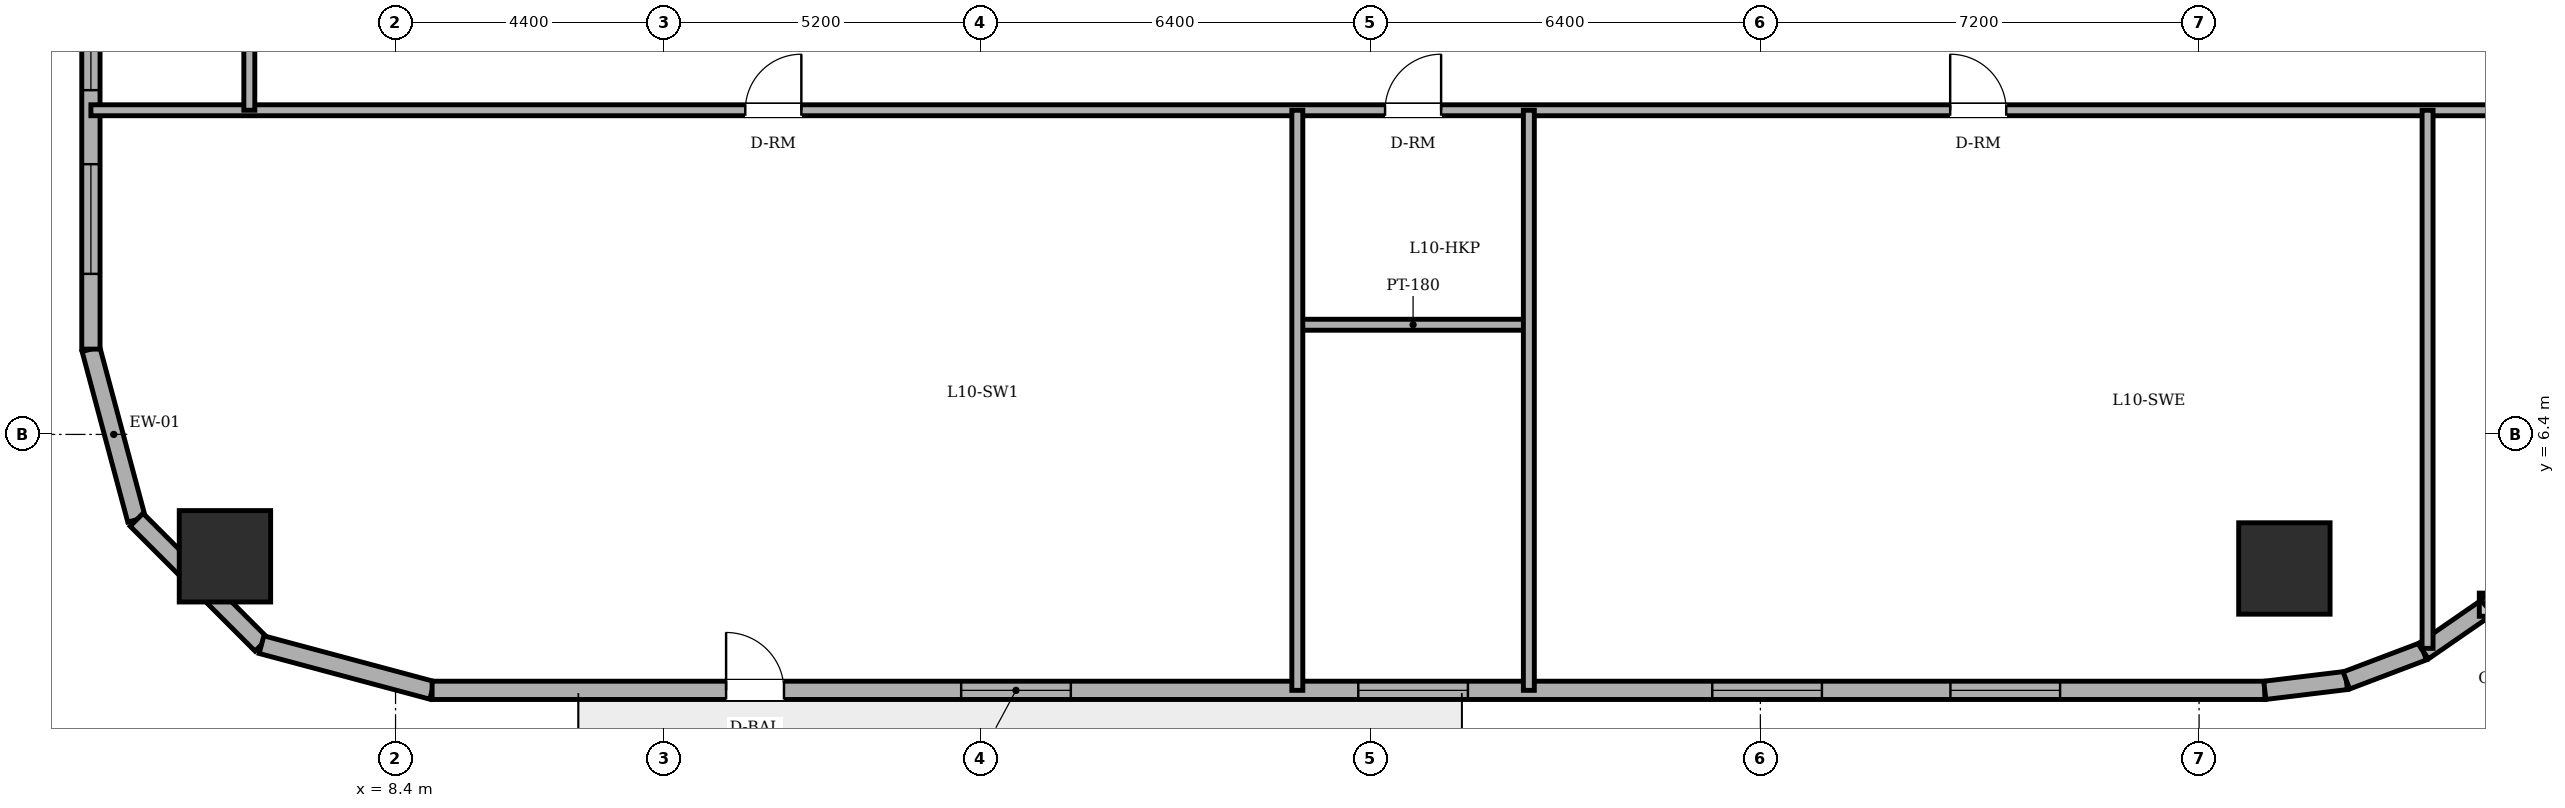
"""IFC4 building model, lengths in metres.
Left out: names, types, materials, properties, quantities, classifications, styles, units other than length and angle.
Written with IfcOpenShell. Run it as: python <this file> out.ifc"""

import sys

from ifc_helpers import new_model, si_unit, direction, frame, frame_2d, origin, origin_2d, place, context, subcontext, project, spatial, rectangle, circle, extrude, element, fill, save


model = new_model("IFC4")
c1 = context("Model", 3, precision=1e-05, world=origin(), true_north=direction((0.0, 1.0)))
c2 = subcontext(c1, "Body", "Model", "MODEL_VIEW")
j1 = project(units=[si_unit("LENGTHUNIT", "METRE"), si_unit("PLANEANGLEUNIT", "RADIAN")], contexts=[c1])
p1 = place(None, origin())
s1 = spatial("IfcSite", under=j1, at=p1, CompositionType="ELEMENT")
p2 = place(p1, origin())
s2 = spatial("IfcBuilding", under=s1, at=p2, CompositionType="ELEMENT")
p3 = place(p2, frame((0.0, 0.0, 39.6)))
s3 = spatial("IfcBuildingStorey", under=s2, at=p3, CompositionType="ELEMENT", Elevation=39.6)
for number, where, z_axis, x_axis in (
    (1, (5.6, 4.4, 0.0), (0.0, 0.0, 1.0), (1.0, 0.0, 0.0)),
    (2, (39.4, 4.2, 0.0), (0.0, 0.0, 1.0), (1.0, 0.0, 0.0)),
):
    element("IfcColumn", number, at=place(p3, frame(where, z_axis=z_axis, x_axis=x_axis)), inside=s3, PredefinedType="COLUMN", context=c2, shape_type="SweptSolid", body=[
        extrude(circle(Radius=0.75, at=origin_2d()), origin(), (0.0, 0.0, 1.0), 3.6),
    ])
p4 = place(p3, frame((3.4, 7.8, 0.0), z_axis=(0.0, 0.0, 1.0), x_axis=(0.258731875344, -0.96594917914, 0.0)))
e3 = element("IfcWall", 3, at=p4, inside=s3, PredefinedType="SOLIDWALL", context=c2, shape_type="SweptSolid", body=[
    extrude(rectangle(XDim=2.899, YDim=0.3, at=frame_2d((1.449, 0.0))), origin(), (0.0, 0.0, 1.0), 3.4),
])
p5 = place(p3, frame((4.15, 5.0, 0.0), z_axis=(0.0, 0.0, 1.0), x_axis=(0.707106781187, -0.707106781187, 0.0)))
e4 = element("IfcWall", 4, at=p5, inside=s3, PredefinedType="SOLIDWALL", context=c2, shape_type="SweptSolid", body=[
    extrude(rectangle(XDim=2.899, YDim=0.3, at=frame_2d((1.45, 0.0))), origin(), (0.0, 0.0, 1.0), 3.4),
])
p6 = place(p3, frame((6.2, 2.95, 0.0), z_axis=(0.0, 0.0, 1.0), x_axis=(0.96594917914, -0.258731875344, 0.0)))
e5 = element("IfcWall", 5, at=p6, inside=s3, PredefinedType="SOLIDWALL", context=c2, shape_type="SweptSolid", body=[
    extrude(rectangle(XDim=2.899, YDim=0.3, at=frame_2d((1.449, 0.0))), origin(), (0.0, 0.0, 1.0), 3.4),
])
p7 = place(p3, frame((9.0, 2.2, 0.0), z_axis=(0.0, 0.0, 1.0), x_axis=(1.0, 0.0, 0.0)))
e6 = element("IfcWall", 6, at=p7, inside=s3, PredefinedType="SOLIDWALL", context=c2, shape_type="SweptSolid", body=[
    extrude(rectangle(XDim=30.079, YDim=0.3, at=frame_2d((15.04, 0.0))), origin(), (0.0, 0.0, 1.0), 3.4),
])
p8 = place(p7, frame((4.825, 0.0, 0.0)))
e7 = element("IfcOpeningElement", 7, at=p8, cuts=e6, PredefinedType="OPENING", context=c2, shape_type="SweptSolid", body=[
    extrude(rectangle(XDim=0.95, YDim=2.2, at=frame_2d((0.475, 1.1))), frame((0.0, 0.16, 0.0), z_axis=(0.0, -1.0, 0.0), x_axis=(1.0, 0.0, 0.0)), (0.0, 0.0, 1.0), 0.32),
])
p9 = place(p7, frame((8.683, 0.0, 0.85)))
e8 = element("IfcOpeningElement", 8, at=p9, cuts=e6, PredefinedType="OPENING", context=c2, shape_type="SweptSolid", body=[
    extrude(rectangle(XDim=1.8, YDim=1.55, at=frame_2d((0.9, 0.775))), frame((0.0, 0.16, 0.0), z_axis=(0.0, -1.0, 0.0), x_axis=(1.0, 0.0, 0.0)), (0.0, 0.0, 1.0), 0.32),
])
p10 = place(p7, frame((15.2, 0.0, 0.85)))
e9 = element("IfcOpeningElement", 9, at=p10, cuts=e6, PredefinedType="OPENING", context=c2, shape_type="SweptSolid", body=[
    extrude(rectangle(XDim=1.8, YDim=1.55, at=frame_2d((0.9, 0.775))), frame((0.0, 0.16, 0.0), z_axis=(0.0, -1.0, 0.0), x_axis=(1.0, 0.0, 0.0)), (0.0, 0.0, 1.0), 0.32),
])
p11 = place(p7, frame((21.01, 0.0, 0.85)))
e10 = element("IfcOpeningElement", 10, at=p11, cuts=e6, PredefinedType="OPENING", context=c2, shape_type="SweptSolid", body=[
    extrude(rectangle(XDim=1.8, YDim=1.55, at=frame_2d((0.9, 0.775))), frame((0.0, 0.16, 0.0), z_axis=(0.0, -1.0, 0.0), x_axis=(1.0, 0.0, 0.0)), (0.0, 0.0, 1.0), 0.32),
])
p12 = place(p7, frame((24.919, 0.0, 0.85)))
e11 = element("IfcOpeningElement", 11, at=p12, cuts=e6, PredefinedType="OPENING", context=c2, shape_type="SweptSolid", body=[
    extrude(rectangle(XDim=1.8, YDim=1.55, at=frame_2d((0.9, 0.775))), frame((0.0, 0.16, 0.0), z_axis=(0.0, -1.0, 0.0), x_axis=(1.0, 0.0, 0.0)), (0.0, 0.0, 1.0), 0.32),
])
p13 = place(p3, frame((39.079, 2.2, 0.0), z_axis=(0.0, 0.0, 1.0), x_axis=(0.992739027259, 0.120288086515, 0.0)))
e12 = element("IfcWall", 12, at=p13, inside=s3, PredefinedType="SOLIDWALL", context=c2, shape_type="SweptSolid", body=[
    extrude(rectangle(XDim=1.348, YDim=0.3, at=frame_2d((0.674, 0.0))), origin(), (0.0, 0.0, 1.0), 3.4),
])
p14 = place(p3, frame((40.417, 2.362, 0.0), z_axis=(0.0, 0.0, 1.0), x_axis=(0.935156721165, 0.354234254216, 0.0)))
e13 = element("IfcWall", 13, at=p14, inside=s3, PredefinedType="SOLIDWALL", context=c2, shape_type="SweptSolid", body=[
    extrude(rectangle(XDim=1.349, YDim=0.3, at=frame_2d((0.675, 0.0))), origin(), (0.0, 0.0, 1.0), 3.4),
])
p15 = place(p3, frame((41.679, 2.84, 0.0), z_axis=(0.0, 0.0, 1.0), x_axis=(0.823116500192, 0.567872544777, 0.0)))
e14 = element("IfcWall", 14, at=p15, inside=s3, PredefinedType="SOLIDWALL", context=c2, shape_type="SweptSolid", body=[
    extrude(rectangle(XDim=1.349, YDim=0.3, at=frame_2d((0.674, 0.0))), origin(), (0.0, 0.0, 1.0), 3.4),
])
p16 = place(p3, frame((3.4, 40.2, 0.0), z_axis=(0.0, 0.0, 1.0), x_axis=(0.0, -1.0, 0.0)))
e15 = element("IfcWall", 15, at=p16, inside=s3, PredefinedType="SOLIDWALL", context=c2, shape_type="SweptSolid", body=[
    extrude(rectangle(XDim=32.4, YDim=0.3, at=frame_2d((16.2, 0.0))), origin(), (0.0, 0.0, 1.0), 3.4),
])
p17 = place(p16, frame((1.235, 0.0, 0.85)))
e16 = element("IfcOpeningElement", 16, at=p17, cuts=e15, PredefinedType="OPENING", context=c2, shape_type="SweptSolid", body=[
    extrude(rectangle(XDim=1.8, YDim=1.55, at=frame_2d((0.9, 0.775))), frame((0.0, 0.16, 0.0), z_axis=(0.0, -1.0, 0.0), x_axis=(1.0, 0.0, 0.0)), (0.0, 0.0, 1.0), 0.32),
])
p18 = place(p16, frame((4.25, 0.0, 0.85)))
e17 = element("IfcOpeningElement", 17, at=p18, cuts=e15, PredefinedType="OPENING", context=c2, shape_type="SweptSolid", body=[
    extrude(rectangle(XDim=1.8, YDim=1.55, at=frame_2d((0.9, 0.775))), frame((0.0, 0.16, 0.0), z_axis=(0.0, -1.0, 0.0), x_axis=(1.0, 0.0, 0.0)), (0.0, 0.0, 1.0), 0.32),
])
p19 = place(p16, frame((9.253, 0.0, 0.85)))
e18 = element("IfcOpeningElement", 18, at=p19, cuts=e15, PredefinedType="OPENING", context=c2, shape_type="SweptSolid", body=[
    extrude(rectangle(XDim=1.8, YDim=1.55, at=frame_2d((0.9, 0.775))), frame((0.0, 0.16, 0.0), z_axis=(0.0, -1.0, 0.0), x_axis=(1.0, 0.0, 0.0)), (0.0, 0.0, 1.0), 0.32),
])
p20 = place(p16, frame((13.027, 0.0, 0.85)))
e19 = element("IfcOpeningElement", 19, at=p20, cuts=e15, PredefinedType="OPENING", context=c2, shape_type="SweptSolid", body=[
    extrude(rectangle(XDim=1.8, YDim=1.55, at=frame_2d((0.9, 0.775))), frame((0.0, 0.16, 0.0), z_axis=(0.0, -1.0, 0.0), x_axis=(1.0, 0.0, 0.0)), (0.0, 0.0, 1.0), 0.32),
])
p21 = place(p16, frame((19.573, 0.0, 0.85)))
e20 = element("IfcOpeningElement", 20, at=p21, cuts=e15, PredefinedType="OPENING", context=c2, shape_type="SweptSolid", body=[
    extrude(rectangle(XDim=1.8, YDim=1.55, at=frame_2d((0.9, 0.775))), frame((0.0, 0.16, 0.0), z_axis=(0.0, -1.0, 0.0), x_axis=(1.0, 0.0, 0.0)), (0.0, 0.0, 1.0), 0.32),
])
p22 = place(p16, frame((22.347, 0.0, 0.85)))
e21 = element("IfcOpeningElement", 21, at=p22, cuts=e15, PredefinedType="OPENING", context=c2, shape_type="SweptSolid", body=[
    extrude(rectangle(XDim=1.8, YDim=1.55, at=frame_2d((0.9, 0.775))), frame((0.0, 0.16, 0.0), z_axis=(0.0, -1.0, 0.0), x_axis=(1.0, 0.0, 0.0)), (0.0, 0.0, 1.0), 0.32),
])
p23 = place(p16, frame((26.35, 0.0, 0.85)))
e22 = element("IfcOpeningElement", 22, at=p23, cuts=e15, PredefinedType="OPENING", context=c2, shape_type="SweptSolid", body=[
    extrude(rectangle(XDim=1.8, YDim=1.55, at=frame_2d((0.9, 0.775))), frame((0.0, 0.16, 0.0), z_axis=(0.0, -1.0, 0.0), x_axis=(1.0, 0.0, 0.0)), (0.0, 0.0, 1.0), 0.32),
])
p24 = place(p16, frame((29.365, 0.0, 0.85)))
e23 = element("IfcOpeningElement", 23, at=p24, cuts=e15, PredefinedType="OPENING", context=c2, shape_type="SweptSolid", body=[
    extrude(rectangle(XDim=1.8, YDim=1.55, at=frame_2d((0.9, 0.775))), frame((0.0, 0.16, 0.0), z_axis=(0.0, -1.0, 0.0), x_axis=(1.0, 0.0, 0.0)), (0.0, 0.0, 1.0), 0.32),
])
p25 = place(p3, frame((23.2, 8.2, 0.0), z_axis=(0.0, 0.0, 1.0), x_axis=(1.0, 0.0, 0.0)))
e24 = element("IfcWall", 24, at=p25, inside=s3, PredefinedType="PARTITIONING", context=c2, shape_type="SweptSolid", body=[
    extrude(rectangle(XDim=3.8, YDim=0.18, at=frame_2d((1.9, 0.0))), origin(), (0.0, 0.0, 1.0), 3.4),
])
p26 = place(p3, frame((3.4, 11.72, 0.0), z_axis=(0.0, 0.0, 1.0), x_axis=(1.0, 0.0, 0.0)))
e25 = element("IfcWall", 25, at=p26, inside=s3, PredefinedType="PARTITIONING", context=c2, shape_type="SweptSolid", body=[
    extrude(rectangle(XDim=47.689, YDim=0.18, at=frame_2d((23.845, 0.0))), origin(), (0.0, 0.0, 1.0), 3.4),
])
p27 = place(p26, frame((21.24, 0.0, 0.0)))
e26 = element("IfcOpeningElement", 26, at=p27, cuts=e25, PredefinedType="OPENING", context=c2, shape_type="SweptSolid", body=[
    extrude(rectangle(XDim=0.92, YDim=2.1, at=frame_2d((0.46, 1.05))), frame((0.0, 0.1, 0.0), z_axis=(0.0, -1.0, 0.0), x_axis=(1.0, 0.0, 0.0)), (0.0, 0.0, 1.0), 0.2),
])
p28 = place(p26, frame((40.39, 0.0, 0.0)))
e27 = element("IfcOpeningElement", 27, at=p28, cuts=e25, PredefinedType="OPENING", context=c2, shape_type="SweptSolid", body=[
    extrude(rectangle(XDim=0.92, YDim=2.1, at=frame_2d((0.46, 1.05))), frame((0.0, 0.1, 0.0), z_axis=(0.0, -1.0, 0.0), x_axis=(1.0, 0.0, 0.0)), (0.0, 0.0, 1.0), 0.2),
])
p29 = place(p26, frame((10.74, 0.0, 0.0)))
e28 = element("IfcOpeningElement", 28, at=p29, cuts=e25, PredefinedType="OPENING", context=c2, shape_type="SweptSolid", body=[
    extrude(rectangle(XDim=0.92, YDim=2.1, at=frame_2d((0.46, 1.05))), frame((0.0, 0.1, 0.0), z_axis=(0.0, -1.0, 0.0), x_axis=(1.0, 0.0, 0.0)), (0.0, 0.0, 1.0), 0.2),
])
p30 = place(p26, frame((30.515, 0.0, 0.0)))
e29 = element("IfcOpeningElement", 29, at=p30, cuts=e25, PredefinedType="OPENING", context=c2, shape_type="SweptSolid", body=[
    extrude(rectangle(XDim=0.92, YDim=2.1, at=frame_2d((0.46, 1.05))), frame((0.0, 0.1, 0.0), z_axis=(0.0, -1.0, 0.0), x_axis=(1.0, 0.0, 0.0)), (0.0, 0.0, 1.0), 0.2),
])
p31 = place(p3, frame((6.0, 11.72, 0.0), z_axis=(0.0, 0.0, 1.0), x_axis=(0.0, 1.0, 0.0)))
e30 = element("IfcWall", 30, at=p31, inside=s3, PredefinedType="PARTITIONING", context=c2, shape_type="SweptSolid", body=[
    extrude(rectangle(XDim=2.46, YDim=0.18, at=frame_2d((1.23, 0.0))), origin(), (0.0, 0.0, 1.0), 3.4),
])
for number, where, z_axis, x_axis in (
    (31, (23.2, 2.2, 0.0), (0.0, 0.0, 1.0), (0.0, 1.0, 0.0)),
    (32, (27.0, 2.2, 0.0), (0.0, 0.0, 1.0), (0.0, 1.0, 0.0)),
):
    element("IfcWall", number, at=place(p3, frame(where, z_axis=z_axis, x_axis=x_axis)), inside=s3, PredefinedType="PARTITIONING", context=c2, shape_type="SweptSolid", body=[
        extrude(rectangle(XDim=9.52, YDim=0.18, at=frame_2d((4.76, 0.0))), origin(), (0.0, 0.0, 1.0), 3.4),
    ])
p32 = place(p3, frame((41.75, 2.889, 0.0), z_axis=(0.0, 0.0, 1.0), x_axis=(0.0, 1.0, 0.0)))
e33 = element("IfcWall", 33, at=p32, inside=s3, PredefinedType="PARTITIONING", context=c2, shape_type="SweptSolid", body=[
    extrude(rectangle(XDim=8.831, YDim=0.18, at=frame_2d((4.416, 0.0))), origin(), (0.0, 0.0, 1.0), 2.782),
])
p33 = place(p8, origin())
e34 = element("IfcDoor", 34, at=p33, inside=s3, OperationType="SINGLE_SWING_LEFT", PredefinedType="DOOR", context=c2, shape_type="SweptSolid", body=[
    extrude(rectangle(XDim=0.95, YDim=2.2, at=frame_2d((0.475, 1.1))), frame((0.0, 0.025, 0.0), z_axis=(0.0, -1.0, 0.0), x_axis=(1.0, 0.0, 0.0)), (0.0, 0.0, 1.0), 0.05),
])
fill(e7, e34)
p34 = place(p9, origin())
e35 = element("IfcWindow", 35, at=p34, inside=s3, PartitioningType="DOUBLE_PANEL_VERTICAL", PredefinedType="WINDOW", context=c2, shape_type="SweptSolid", body=[
    extrude(rectangle(XDim=1.8, YDim=1.55, at=frame_2d((0.9, 0.775))), frame((0.0, 0.03, 0.0), z_axis=(0.0, -1.0, 0.0), x_axis=(1.0, 0.0, 0.0)), (0.0, 0.0, 1.0), 0.06),
])
fill(e8, e35)
p35 = place(p10, origin())
e36 = element("IfcWindow", 36, at=p35, inside=s3, PartitioningType="DOUBLE_PANEL_VERTICAL", PredefinedType="WINDOW", context=c2, shape_type="SweptSolid", body=[
    extrude(rectangle(XDim=1.8, YDim=1.55, at=frame_2d((0.9, 0.775))), frame((0.0, 0.03, 0.0), z_axis=(0.0, -1.0, 0.0), x_axis=(1.0, 0.0, 0.0)), (0.0, 0.0, 1.0), 0.06),
])
fill(e9, e36)
p36 = place(p11, origin())
e37 = element("IfcWindow", 37, at=p36, inside=s3, PartitioningType="DOUBLE_PANEL_VERTICAL", PredefinedType="WINDOW", context=c2, shape_type="SweptSolid", body=[
    extrude(rectangle(XDim=1.8, YDim=1.55, at=frame_2d((0.9, 0.775))), frame((0.0, 0.03, 0.0), z_axis=(0.0, -1.0, 0.0), x_axis=(1.0, 0.0, 0.0)), (0.0, 0.0, 1.0), 0.06),
])
fill(e10, e37)
p37 = place(p12, origin())
e38 = element("IfcWindow", 38, at=p37, inside=s3, PartitioningType="DOUBLE_PANEL_VERTICAL", PredefinedType="WINDOW", context=c2, shape_type="SweptSolid", body=[
    extrude(rectangle(XDim=1.8, YDim=1.55, at=frame_2d((0.9, 0.775))), frame((0.0, 0.03, 0.0), z_axis=(0.0, -1.0, 0.0), x_axis=(1.0, 0.0, 0.0)), (0.0, 0.0, 1.0), 0.06),
])
fill(e11, e38)
p38 = place(p23, origin())
e39 = element("IfcWindow", 39, at=p38, inside=s3, PartitioningType="DOUBLE_PANEL_VERTICAL", PredefinedType="WINDOW", context=c2, shape_type="SweptSolid", body=[
    extrude(rectangle(XDim=1.8, YDim=1.55, at=frame_2d((0.9, 0.775))), frame((0.0, 0.03, 0.0), z_axis=(0.0, -1.0, 0.0), x_axis=(1.0, 0.0, 0.0)), (0.0, 0.0, 1.0), 0.06),
])
fill(e22, e39)
p39 = place(p24, origin())
e40 = element("IfcWindow", 40, at=p39, inside=s3, PartitioningType="DOUBLE_PANEL_VERTICAL", PredefinedType="WINDOW", context=c2, shape_type="SweptSolid", body=[
    extrude(rectangle(XDim=1.8, YDim=1.55, at=frame_2d((0.9, 0.775))), frame((0.0, 0.03, 0.0), z_axis=(0.0, -1.0, 0.0), x_axis=(1.0, 0.0, 0.0)), (0.0, 0.0, 1.0), 0.06),
])
fill(e23, e40)
p40 = place(p27, origin())
e41 = element("IfcDoor", 41, at=p40, inside=s3, OperationType="SINGLE_SWING_RIGHT", PredefinedType="DOOR", context=c2, shape_type="SweptSolid", body=[
    extrude(rectangle(XDim=0.92, YDim=2.1, at=frame_2d((0.46, 1.05))), frame((0.0, 0.025, 0.0), z_axis=(0.0, -1.0, 0.0), x_axis=(1.0, 0.0, 0.0)), (0.0, 0.0, 1.0), 0.05),
])
fill(e26, e41)
p41 = place(p29, origin())
e42 = element("IfcDoor", 42, at=p41, inside=s3, OperationType="SINGLE_SWING_RIGHT", PredefinedType="DOOR", context=c2, shape_type="SweptSolid", body=[
    extrude(rectangle(XDim=0.92, YDim=2.1, at=frame_2d((0.46, 1.05))), frame((0.0, 0.025, 0.0), z_axis=(0.0, -1.0, 0.0), x_axis=(1.0, 0.0, 0.0)), (0.0, 0.0, 1.0), 0.05),
])
fill(e28, e42)
p42 = place(p30, origin())
e43 = element("IfcDoor", 43, at=p42, inside=s3, OperationType="SINGLE_SWING_LEFT", PredefinedType="DOOR", context=c2, shape_type="SweptSolid", body=[
    extrude(rectangle(XDim=0.92, YDim=2.1, at=frame_2d((0.46, 1.05))), frame((0.0, 0.025, 0.0), z_axis=(0.0, -1.0, 0.0), x_axis=(1.0, 0.0, 0.0)), (0.0, 0.0, 1.0), 0.05),
])
fill(e29, e43)
save(model, sys.argv[1])
